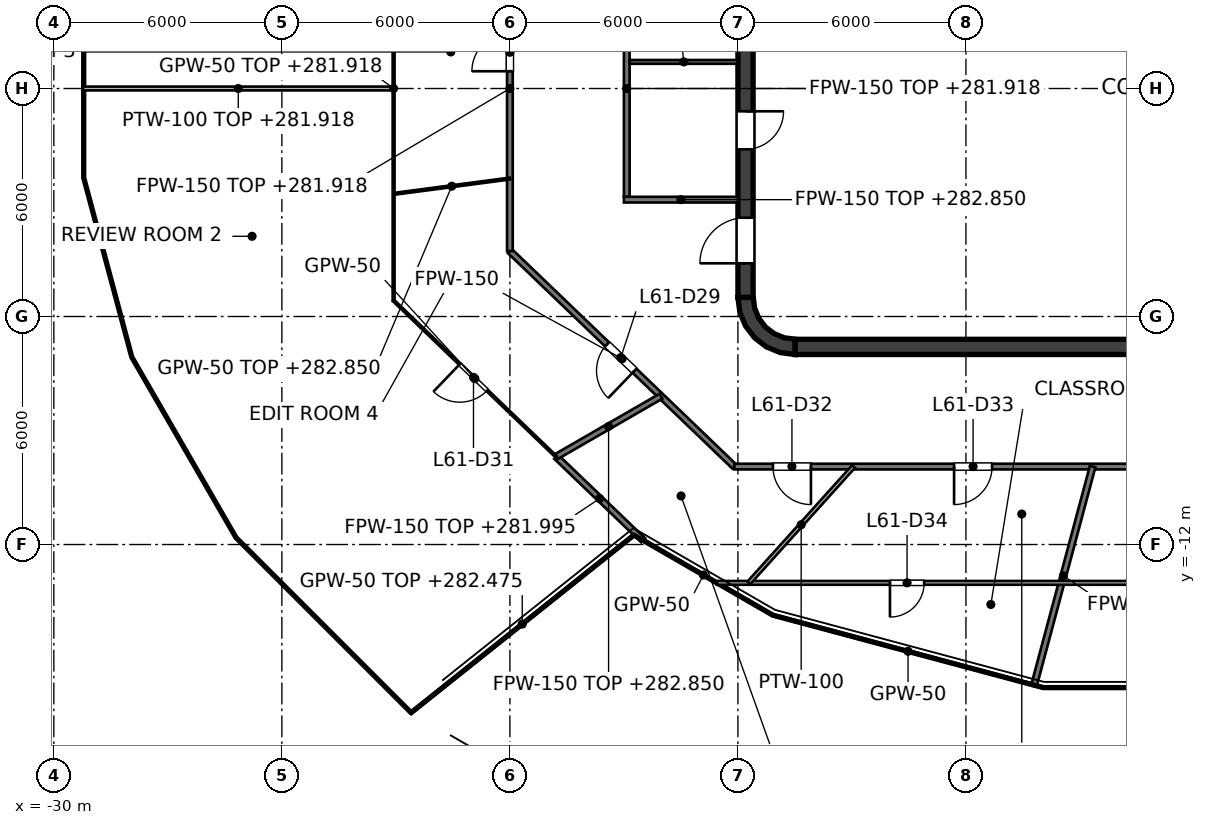
"""IFC4 building model, lengths in metres.
Left out: names, types, materials, properties, quantities, classifications, styles, units other than length and angle.
Written with IfcOpenShell. Run it as: python <this file> out.ifc"""

import sys

from ifc_helpers import new_model, si_unit, direction, frame, frame_2d, origin, place, context, subcontext, project, spatial, polyline, rectangle, outline, extrude, element, fill, save


model = new_model("IFC4")
c1 = context("Model", 3, precision=1e-05, world=origin(), true_north=direction((0.0, 1.0)))
c2 = subcontext(c1, "Body", "Model", "MODEL_VIEW")
j1 = project(units=[si_unit("LENGTHUNIT", "METRE"), si_unit("PLANEANGLEUNIT", "RADIAN")], contexts=[c1])
p1 = place(None, origin())
s1 = spatial("IfcSite", under=j1, at=p1, CompositionType="ELEMENT")
p2 = place(p1, origin())
s2 = spatial("IfcBuilding", under=s1, at=p2, CompositionType="ELEMENT")
p3 = place(p2, frame((0.0, 0.0, 279.0)))
s3 = spatial("IfcBuildingStorey", under=s2, at=p3, CompositionType="ELEMENT", Elevation=279.0)
p4 = place(p3, frame((-10.5, -6.8, 0.0), z_axis=(0.0, 0.0, 1.0), x_axis=(1.0, 0.0, 0.0)))
e1 = element("IfcWall", 1, at=p4, inside=s3, PredefinedType="SHEAR", context=c2, shape_type="SweptSolid", body=[
    extrude(rectangle(XDim=21.0, YDim=0.4, at=frame_2d((10.5, 0.0))), origin(), (0.0, 0.0, 1.0), 4.0),
])
p5 = place(p3, frame((-11.8, -5.5, 0.0), z_axis=(0.0, 0.0, 1.0), x_axis=(0.0, 1.0, 0.0)))
e2 = element("IfcWall", 2, at=p5, inside=s3, PredefinedType="SHEAR", context=c2, shape_type="SweptSolid", body=[
    extrude(rectangle(XDim=11.0, YDim=0.4, at=frame_2d((5.5, 0.0))), origin(), (0.0, 0.0, 1.0), 4.0),
])
p6 = place(p5, frame((3.9, 0.0, 0.0)))
e3 = element("IfcOpeningElement", 3, at=p6, cuts=e2, PredefinedType="OPENING", context=c2, shape_type="SweptSolid", body=[
    extrude(rectangle(XDim=1.0, YDim=2.1, at=frame_2d((0.5, 1.05))), frame((0.0, 0.2, 0.0), z_axis=(0.0, -1.0, 0.0), x_axis=(1.0, 0.0, 0.0)), (0.0, 0.0, 1.0), 0.4),
])
p7 = place(p5, frame((6.8, 0.0, 0.0)))
e4 = element("IfcOpeningElement", 4, at=p7, cuts=e2, PredefinedType="OPENING", context=c2, shape_type="SweptSolid", body=[
    extrude(rectangle(XDim=1.0, YDim=2.1, at=frame_2d((0.5, 1.05))), frame((0.0, 0.2, 0.0), z_axis=(0.0, -1.0, 0.0), x_axis=(1.0, 0.0, 0.0)), (0.0, 0.0, 1.0), 0.4),
])
p8 = place(p5, frame((0.9, 0.0, 0.0)))
e5 = element("IfcOpeningElement", 5, at=p8, cuts=e2, PredefinedType="OPENING", context=c2, shape_type="SweptSolid", body=[
    extrude(rectangle(XDim=1.2, YDim=2.1, at=frame_2d((0.6, 1.05))), frame((0.0, 0.2, 0.0), z_axis=(0.0, -1.0, 0.0), x_axis=(1.0, 0.0, 0.0)), (0.0, 0.0, 1.0), 0.4),
])
p9 = place(p5, frame((8.9, 0.0, 0.0)))
e6 = element("IfcOpeningElement", 6, at=p9, cuts=e2, PredefinedType="OPENING", context=c2, shape_type="SweptSolid", body=[
    extrude(rectangle(XDim=1.2, YDim=2.1, at=frame_2d((0.6, 1.05))), frame((0.0, 0.2, 0.0), z_axis=(0.0, -1.0, 0.0), x_axis=(1.0, 0.0, 0.0)), (0.0, 0.0, 1.0), 0.4),
])
p10 = place(p3, origin())
e7 = element("IfcWall", 7, at=p10, inside=s3, PredefinedType="SHEAR", context=c2, shape_type="SweptSolid", body=[
    extrude(outline(polyline([(-10.5, -7.0), (-10.5, -6.596), (-10.784, -6.559), (-11.048, -6.45), (-11.275, -6.275), (-11.45, -6.048), (-11.559, -5.784), (-11.596, -5.5), (-12.0, -5.5), (-11.949, -5.888), (-11.799, -6.25), (-11.561, -6.561), (-11.25, -6.799), (-10.888, -6.949), (-10.5, -7.0)])), origin(), (0.0, 0.0, 1.0), 4.0),
])
p11 = place(p3, frame((-9.0, -6.6, 0.0), z_axis=(0.0, 0.0, 1.0), x_axis=(0.0, 1.0, 0.0)))
e8 = element("IfcWall", 8, at=p11, inside=s3, PredefinedType="PARTITIONING", context=c2, shape_type="SweptSolid", body=[
    extrude(rectangle(XDim=2.5, YDim=0.25, at=frame_2d((1.25, 0.0))), origin(), (0.0, 0.0, 1.0), 3.85),
])
p12 = place(p11, frame((0.75, 0.0, 0.0)))
e9 = element("IfcOpeningElement", 9, at=p12, cuts=e8, PredefinedType="OPENING", context=c2, shape_type="SweptSolid", body=[
    extrude(rectangle(XDim=1.0, YDim=2.1, at=frame_2d((0.5, 1.05))), frame((0.0, 0.125, 0.0), z_axis=(0.0, -1.0, 0.0), x_axis=(1.0, 0.0, 0.0)), (0.0, 0.0, 1.0), 0.25),
])
p13 = place(p3, frame((-2.9, -6.6, 0.0), z_axis=(0.0, 0.0, 1.0), x_axis=(0.0, 1.0, 0.0)))
e10 = element("IfcWall", 10, at=p13, inside=s3, PredefinedType="PARTITIONING", context=c2, shape_type="SweptSolid", body=[
    extrude(rectangle(XDim=2.5, YDim=0.25, at=frame_2d((1.25, 0.0))), origin(), (0.0, 0.0, 1.0), 3.85),
])
p14 = place(p13, frame((0.8, 0.0, 0.0)))
e11 = element("IfcOpeningElement", 11, at=p14, cuts=e10, PredefinedType="OPENING", context=c2, shape_type="SweptSolid", body=[
    extrude(rectangle(XDim=0.9, YDim=2.1, at=frame_2d((0.45, 1.05))), frame((0.0, 0.125, 0.0), z_axis=(0.0, -1.0, 0.0), x_axis=(1.0, 0.0, 0.0)), (0.0, 0.0, 1.0), 0.25),
])
p15 = place(p3, frame((-9.125, -1.525, 0.0), z_axis=(0.0, 0.0, 1.0), x_axis=(1.0, 0.0, 0.0)))
e12 = element("IfcWall", 12, at=p15, inside=s3, PredefinedType="SOLIDWALL", context=c2, shape_type="SweptSolid", body=[
    extrude(rectangle(XDim=18.25, YDim=0.25, at=frame_2d((9.125, 0.0))), origin(), (0.0, 0.0, 1.0), 3.85),
])
p16 = place(p15, frame((7.15, 0.0, 0.0)))
e13 = element("IfcOpeningElement", 13, at=p16, cuts=e12, PredefinedType="OPENING", context=c2, shape_type="SweptSolid", body=[
    extrude(rectangle(XDim=1.2, YDim=2.1, at=frame_2d((0.6, 1.05))), frame((0.0, 0.125, 0.0), z_axis=(0.0, -1.0, 0.0), x_axis=(1.0, 0.0, 0.0)), (0.0, 0.0, 1.0), 0.25),
])
p17 = place(p15, frame((10.2, 0.0, 0.0)))
e14 = element("IfcOpeningElement", 14, at=p17, cuts=e12, PredefinedType="OPENING", context=c2, shape_type="SweptSolid", body=[
    extrude(rectangle(XDim=1.2, YDim=2.1, at=frame_2d((0.6, 1.05))), frame((0.0, 0.125, 0.0), z_axis=(0.0, -1.0, 0.0), x_axis=(1.0, 0.0, 0.0)), (0.0, 0.0, 1.0), 0.25),
])
p18 = place(p15, frame((16.075, 0.0, 0.0)))
e15 = element("IfcOpeningElement", 15, at=p18, cuts=e12, PredefinedType="OPENING", context=c2, shape_type="SweptSolid", body=[
    extrude(rectangle(XDim=1.0, YDim=2.1, at=frame_2d((0.5, 1.05))), frame((0.0, 0.125, 0.0), z_axis=(0.0, -1.0, 0.0), x_axis=(1.0, 0.0, 0.0)), (0.0, 0.0, 1.0), 0.25),
])
p19 = place(p3, frame((-9.125, -3.975, 0.0), z_axis=(0.0, 0.0, 1.0), x_axis=(1.0, 0.0, 0.0)))
e16 = element("IfcWall", 16, at=p19, inside=s3, PredefinedType="SOLIDWALL", context=c2, shape_type="SweptSolid", body=[
    extrude(rectangle(XDim=12.4, YDim=0.25, at=frame_2d((6.2, 0.0))), origin(), (0.0, 0.0, 1.0), 3.85),
])
p20 = place(p19, frame((1.05, 0.0, 0.0)))
e17 = element("IfcOpeningElement", 17, at=p20, cuts=e16, PredefinedType="OPENING", context=c2, shape_type="SweptSolid", body=[
    extrude(rectangle(XDim=1.2, YDim=2.1, at=frame_2d((0.6, 1.05))), frame((0.0, 0.125, 0.0), z_axis=(0.0, -1.0, 0.0), x_axis=(1.0, 0.0, 0.0)), (0.0, 0.0, 1.0), 0.25),
])
p21 = place(p19, frame((4.1, 0.0, 0.0)))
e18 = element("IfcOpeningElement", 18, at=p21, cuts=e16, PredefinedType="OPENING", context=c2, shape_type="SweptSolid", body=[
    extrude(rectangle(XDim=1.2, YDim=2.1, at=frame_2d((0.6, 1.05))), frame((0.0, 0.125, 0.0), z_axis=(0.0, -1.0, 0.0), x_axis=(1.0, 0.0, 0.0)), (0.0, 0.0, 1.0), 0.25),
])
for number, where, z_axis, x_axis in (
    (19, (-9.0, -3.85, 0.0), (0.0, 0.0, 1.0), (0.0, 1.0, 0.0)),
    (20, (-5.95, -3.85, 0.0), (0.0, 0.0, 1.0), (0.0, 1.0, 0.0)),
    (21, (-2.9, -3.85, 0.0), (0.0, 0.0, 1.0), (0.0, 1.0, 0.0)),
):
    element("IfcWall", number, at=place(p3, frame(where, z_axis=z_axis, x_axis=x_axis)), inside=s3, PredefinedType="SOLIDWALL", context=c2, shape_type="SweptSolid", body=[
        extrude(rectangle(XDim=2.2, YDim=0.25, at=frame_2d((1.1, 0.0))), origin(), (0.0, 0.0, 1.0), 3.85),
    ])
p22 = place(p3, frame((-14.925, -2.85, 0.0), z_axis=(0.0, 0.0, 1.0), x_axis=(0.0, 1.0, 0.0)))
e22 = element("IfcWall", 22, at=p22, inside=s3, PredefinedType="PARTITIONING", context=c2, shape_type="SweptSolid", body=[
    extrude(rectangle(XDim=5.7, YDim=0.15, at=frame_2d((2.85, 0.0))), origin(), (0.0, 0.0, 1.0), 2.918),
])
p23 = place(p3, frame((-15.0, -2.925, 0.0), z_axis=(0.0, 0.0, 1.0), x_axis=(1.0, 0.0, 0.0)))
e23 = element("IfcWall", 23, at=p23, inside=s3, PredefinedType="PARTITIONING", context=c2, shape_type="SweptSolid", body=[
    extrude(rectangle(XDim=3.0, YDim=0.15, at=frame_2d((1.5, 0.0))), origin(), (0.0, 0.0, 1.0), 3.85),
])
p24 = place(p3, frame((-14.85, 0.7, 0.0), z_axis=(0.0, 0.0, 1.0), x_axis=(1.0, 0.0, 0.0)))
e24 = element("IfcWall", 24, at=p24, inside=s3, PredefinedType="PARTITIONING", context=c2, shape_type="SweptSolid", body=[
    extrude(rectangle(XDim=2.85, YDim=0.1, at=frame_2d((1.425, 0.0))), origin(), (0.0, 0.0, 1.0), 3.85),
])
p25 = place(p3, frame((-16.783, -9.69, 0.0), z_axis=(0.0, 0.0, 1.0), x_axis=(0.721336622544, -0.692584635245, 0.0)))
e25 = element("IfcWall", 25, at=p25, inside=s3, PredefinedType="PARTITIONING", context=c2, shape_type="SweptSolid", body=[
    extrude(rectangle(XDim=3.176, YDim=0.15, at=frame_2d((1.588, 0.0))), origin(), (0.0, 0.0, 1.0), 2.995),
])
p26 = place(p3, frame((-18.0, -4.278, 0.0), z_axis=(0.0, 0.0, 1.0), x_axis=(0.721348586031, -0.692572174889, 0.0)))
e26 = element("IfcWall", 26, at=p26, inside=s3, PredefinedType="PARTITIONING", context=c2, shape_type="SweptSolid", body=[
    extrude(rectangle(XDim=8.187, YDim=0.15, at=frame_2d((4.094, 0.0))), origin(), (0.0, 0.0, 1.0), 2.927),
])
p27 = place(p26, frame((3.546, 0.0, 0.0)))
e27 = element("IfcOpeningElement", 27, at=p27, cuts=e26, PredefinedType="OPENING", context=c2, shape_type="SweptSolid", body=[
    extrude(rectangle(XDim=1.0, YDim=2.1, at=frame_2d((0.5, 1.05))), frame((0.0, 0.075, 0.0), z_axis=(0.0, -1.0, 0.0), x_axis=(1.0, 0.0, 0.0)), (0.0, 0.0, 1.0), 0.15),
])
p28 = place(p3, frame((-12.095, -9.949, 0.0), z_axis=(0.0, 0.0, 1.0), x_axis=(1.0, 0.0, 0.0)))
e28 = element("IfcWall", 28, at=p28, inside=s3, PredefinedType="PARTITIONING", context=c2, shape_type="SweptSolid", body=[
    extrude(rectangle(XDim=24.19, YDim=0.15, at=frame_2d((12.095, 0.0))), origin(), (0.0, 0.0, 1.0), 2.927),
])
p29 = place(p28, frame((16.259, 0.0, 0.0)))
e29 = element("IfcOpeningElement", 29, at=p29, cuts=e28, PredefinedType="OPENING", context=c2, shape_type="SweptSolid", body=[
    extrude(rectangle(XDim=1.0, YDim=2.1, at=frame_2d((0.5, 1.05))), frame((0.0, 0.075, 0.0), z_axis=(0.0, -1.0, 0.0), x_axis=(1.0, 0.0, 0.0)), (0.0, 0.0, 1.0), 0.15),
])
p30 = place(p28, frame((1.016, 0.0, 0.0)))
e30 = element("IfcOpeningElement", 30, at=p30, cuts=e28, PredefinedType="OPENING", context=c2, shape_type="SweptSolid", body=[
    extrude(rectangle(XDim=1.0, YDim=2.1, at=frame_2d((0.5, 1.05))), frame((0.0, 0.075, 0.0), z_axis=(0.0, -1.0, 0.0), x_axis=(1.0, 0.0, 0.0)), (0.0, 0.0, 1.0), 0.15),
])
p31 = place(p28, frame((5.783, 0.0, 0.0)))
e31 = element("IfcOpeningElement", 31, at=p31, cuts=e28, PredefinedType="OPENING", context=c2, shape_type="SweptSolid", body=[
    extrude(rectangle(XDim=1.0, YDim=2.1, at=frame_2d((0.5, 1.05))), frame((0.0, 0.075, 0.0), z_axis=(0.0, -1.0, 0.0), x_axis=(1.0, 0.0, 0.0)), (0.0, 0.0, 1.0), 0.15),
])
p32 = place(p3, frame((-16.783, -9.69, 0.0), z_axis=(0.0, 0.0, 1.0), x_axis=(0.866013304951, 0.500020955208, 0.0)))
e32 = element("IfcWall", 32, at=p32, inside=s3, PredefinedType="PARTITIONING", context=c2, shape_type="SweptSolid", body=[
    extrude(rectangle(XDim=3.186, YDim=0.15, at=frame_2d((1.593, 0.0))), origin(), (0.0, 0.0, 1.0), 3.85),
])
p33 = place(p3, frame((-4.207, -15.701, 0.0), z_axis=(0.0, 0.0, 1.0), x_axis=(0.258785268971, 0.965934875943, 0.0)))
e33 = element("IfcWall", 33, at=p33, inside=s3, PredefinedType="PARTITIONING", context=c2, shape_type="SweptSolid", body=[
    extrude(rectangle(XDim=5.955, YDim=0.15, at=frame_2d((2.978, 0.0))), origin(), (0.0, 0.0, 1.0), 3.85),
])
p34 = place(p3, frame((-18.0, -4.278, 0.0), z_axis=(0.0, 0.0, 1.0), x_axis=(0.0, 1.0, 0.0)))
e34 = element("IfcWall", 34, at=p34, inside=s3, PredefinedType="PARTITIONING", context=c2, shape_type="SweptSolid", body=[
    extrude(rectangle(XDim=8.556, YDim=0.15, at=frame_2d((4.278, 0.0))), origin(), (0.0, 0.0, 1.0), 2.918),
])
p35 = place(p34, frame((4.732, 0.0, 0.0)))
e35 = element("IfcOpeningElement", 35, at=p35, cuts=e34, PredefinedType="OPENING", context=c2, shape_type="SweptSolid", body=[
    extrude(rectangle(XDim=1.0, YDim=2.1, at=frame_2d((0.5, 1.05))), frame((0.0, 0.075, 0.0), z_axis=(0.0, -1.0, 0.0), x_axis=(1.0, 0.0, 0.0)), (0.0, 0.0, 1.0), 0.15),
])
p36 = place(p3, frame((-21.06, -5.582, 0.0), z_axis=(0.0, 0.0, 1.0), x_axis=(0.721227701814, -0.692698059862, 0.0)))
e36 = element("IfcWall", 36, at=p36, inside=s3, PredefinedType="PARTITIONING", context=c2, shape_type="SweptSolid", body=[
    extrude(rectangle(XDim=5.93, YDim=0.05, at=frame_2d((2.965, 0.0))), origin(), (0.0, 0.0, 1.0), 2.927),
])
p37 = place(p36, frame((2.415, 0.0, 0.0)))
e37 = element("IfcOpeningElement", 37, at=p37, cuts=e36, PredefinedType="OPENING", context=c2, shape_type="SweptSolid", body=[
    extrude(rectangle(XDim=1.0, YDim=2.1, at=frame_2d((0.5, 1.05))), frame((0.0, 0.025, 0.0), z_axis=(0.0, -1.0, 0.0), x_axis=(1.0, 0.0, 0.0)), (0.0, 0.0, 1.0), 0.05),
])
p38 = place(p3, frame((-14.735, -11.749, 0.0), z_axis=(0.0, 0.0, 1.0), x_axis=(0.866163431647, -0.499760852486, 0.0)))
e38 = element("IfcWall", 38, at=p38, inside=s3, PredefinedType="PARTITIONING", context=c2, shape_type="SweptSolid", body=[
    extrude(rectangle(XDim=4.22, YDim=0.05, at=frame_2d((2.11, 0.0))), origin(), (0.0, 0.0, 1.0), 2.927),
])
p39 = place(p3, frame((-11.081, -13.859, 0.0), z_axis=(0.0, 0.0, 1.0), x_axis=(0.966075753544, -0.258258859314, 0.0)))
e39 = element("IfcWall", 39, at=p39, inside=s3, PredefinedType="PARTITIONING", context=c2, shape_type="SweptSolid", body=[
    extrude(rectangle(XDim=7.365, YDim=0.05, at=frame_2d((3.683, 0.0))), origin(), (0.0, 0.0, 1.0), 2.927),
])
p40 = place(p3, frame((-3.967, -15.765, 0.0), z_axis=(0.0, 0.0, 1.0), x_axis=(1.0, 0.0, 0.0)))
e40 = element("IfcWall", 40, at=p40, inside=s3, PredefinedType="PARTITIONING", context=c2, shape_type="SweptSolid", body=[
    extrude(rectangle(XDim=7.934, YDim=0.05, at=frame_2d((3.967, 0.0))), origin(), (0.0, 0.0, 1.0), 2.927),
])
p41 = place(p3, frame((-21.06, -2.773, 0.0), z_axis=(0.0, 0.0, 1.0), x_axis=(0.991446216664, 0.130515897359, 0.0)))
e41 = element("IfcWall", 41, at=p41, inside=s3, PredefinedType="PARTITIONING", context=c2, shape_type="SweptSolid", body=[
    extrude(rectangle(XDim=3.086, YDim=0.05, at=frame_2d((1.543, 0.0))), origin(), (0.0, 0.0, 1.0), 3.85),
])
p42 = place(p3, frame((-20.615, -16.438, 0.0), z_axis=(0.0, 0.0, 1.0), x_axis=(0.781837006738, 0.623482874581, 0.0)))
e42 = element("IfcWall", 42, at=p42, inside=s3, PredefinedType="PARTITIONING", context=c2, shape_type="SweptSolid", body=[
    extrude(rectangle(XDim=7.521, YDim=0.05, at=frame_2d((3.76, 0.0))), origin(), (0.0, 0.0, 1.0), 3.475),
])
p43 = place(p3, frame((-21.06, -5.582, 0.0), z_axis=(0.0, 0.0, 1.0), x_axis=(0.0, 1.0, 0.0)))
e43 = element("IfcWall", 43, at=p43, inside=s3, PredefinedType="PARTITIONING", context=c2, shape_type="SweptSolid", body=[
    extrude(rectangle(XDim=11.164, YDim=0.05, at=frame_2d((5.582, 0.0))), origin(), (0.0, 0.0, 1.0), 2.918),
])
p44 = place(p43, frame((7.822, 0.0, 0.0)))
e44 = element("IfcOpeningElement", 44, at=p44, cuts=e43, PredefinedType="OPENING", context=c2, shape_type="SweptSolid", body=[
    extrude(rectangle(XDim=1.0, YDim=2.1, at=frame_2d((0.5, 1.05))), frame((0.0, 0.025, 0.0), z_axis=(0.0, -1.0, 0.0), x_axis=(1.0, 0.0, 0.0)), (0.0, 0.0, 1.0), 0.05),
])
p45 = place(p3, frame((-12.553, -13.009, 0.0), z_axis=(0.0, 0.0, 1.0), x_axis=(1.0, 0.0, 0.0)))
e45 = element("IfcWall", 45, at=p45, inside=s3, PredefinedType="PARTITIONING", context=c2, shape_type="SweptSolid", body=[
    extrude(rectangle(XDim=25.879, YDim=0.1, at=frame_2d((12.939, 0.0))), origin(), (0.0, 0.0, 1.0), 2.927),
])
p46 = place(p45, frame((16.973, 0.0, 0.0)))
e46 = element("IfcOpeningElement", 46, at=p46, cuts=e45, PredefinedType="OPENING", context=c2, shape_type="SweptSolid", body=[
    extrude(rectangle(XDim=0.9, YDim=2.1, at=frame_2d((0.45, 1.05))), frame((0.0, 0.05, 0.0), z_axis=(0.0, -1.0, 0.0), x_axis=(1.0, 0.0, 0.0)), (0.0, 0.0, 1.0), 0.1),
])
p47 = place(p45, frame((4.554, 0.0, 0.0)))
e47 = element("IfcOpeningElement", 47, at=p47, cuts=e45, PredefinedType="OPENING", context=c2, shape_type="SweptSolid", body=[
    extrude(rectangle(XDim=0.9, YDim=2.1, at=frame_2d((0.45, 1.05))), frame((0.0, 0.05, 0.0), z_axis=(0.0, -1.0, 0.0), x_axis=(1.0, 0.0, 0.0)), (0.0, 0.0, 1.0), 0.1),
])
p48 = place(p3, frame((-29.234, 0.0, 0.0), z_axis=(0.0, 0.0, 1.0), x_axis=(1.0, 0.0, 0.0)))
e48 = element("IfcWall", 48, at=p48, inside=s3, PredefinedType="PARTITIONING", context=c2, shape_type="SweptSolid", body=[
    extrude(rectangle(XDim=8.174, YDim=0.1, at=frame_2d((4.087, 0.0))), origin(), (0.0, 0.0, 1.0), 2.918),
])
p49 = place(p3, frame((-11.713, -13.009, 0.0), z_axis=(0.0, 0.0, 1.0), x_axis=(0.669076105541, 0.743193894616, 0.0)))
e49 = element("IfcWall", 49, at=p49, inside=s3, PredefinedType="PARTITIONING", context=c2, shape_type="SweptSolid", body=[
    extrude(rectangle(XDim=4.117, YDim=0.1, at=frame_2d((2.059, 0.0))), origin(), (0.0, 0.0, 1.0), 2.927),
])
p50 = place(p20, origin())
e50 = element("IfcDoor", 50, at=p50, inside=s3, OperationType="DOUBLE_DOOR_SLIDING", PredefinedType="DOOR", context=c2, shape_type="SweptSolid", body=[
    extrude(rectangle(XDim=1.2, YDim=2.1, at=frame_2d((0.6, 1.05))), frame((0.0, 0.025, 0.0), z_axis=(0.0, -1.0, 0.0), x_axis=(1.0, 0.0, 0.0)), (0.0, 0.0, 1.0), 0.05),
])
fill(e17, e50)
p51 = place(p21, origin())
e51 = element("IfcDoor", 51, at=p51, inside=s3, OperationType="DOUBLE_DOOR_SLIDING", PredefinedType="DOOR", context=c2, shape_type="SweptSolid", body=[
    extrude(rectangle(XDim=1.2, YDim=2.1, at=frame_2d((0.6, 1.05))), frame((0.0, 0.025, 0.0), z_axis=(0.0, -1.0, 0.0), x_axis=(1.0, 0.0, 0.0)), (0.0, 0.0, 1.0), 0.05),
])
fill(e18, e51)
p52 = place(p16, origin())
e52 = element("IfcDoor", 52, at=p52, inside=s3, OperationType="DOUBLE_DOOR_SLIDING", PredefinedType="DOOR", context=c2, shape_type="SweptSolid", body=[
    extrude(rectangle(XDim=1.2, YDim=2.1, at=frame_2d((0.6, 1.05))), frame((0.0, 0.025, 0.0), z_axis=(0.0, -1.0, 0.0), x_axis=(1.0, 0.0, 0.0)), (0.0, 0.0, 1.0), 0.05),
])
fill(e13, e52)
p53 = place(p12, origin())
e53 = element("IfcDoor", 53, at=p53, inside=s3, OperationType="SINGLE_SWING_LEFT", PredefinedType="DOOR", context=c2, shape_type="SweptSolid", body=[
    extrude(rectangle(XDim=1.0, YDim=2.1, at=frame_2d((0.5, 1.05))), frame((0.0, 0.025, 0.0), z_axis=(0.0, -1.0, 0.0), x_axis=(1.0, 0.0, 0.0)), (0.0, 0.0, 1.0), 0.05),
])
fill(e9, e53)
p54 = place(p14, origin())
e54 = element("IfcDoor", 54, at=p54, inside=s3, OperationType="SINGLE_SWING_RIGHT", PredefinedType="DOOR", context=c2, shape_type="SweptSolid", body=[
    extrude(rectangle(XDim=0.9, YDim=2.1, at=frame_2d((0.45, 1.05))), frame((0.0, 0.025, 0.0), z_axis=(0.0, -1.0, 0.0), x_axis=(1.0, 0.0, 0.0)), (0.0, 0.0, 1.0), 0.05),
])
fill(e11, e54)
p55 = place(p6, origin())
e55 = element("IfcDoor", 55, at=p55, inside=s3, OperationType="SINGLE_SWING_RIGHT", PredefinedType="DOOR", context=c2, shape_type="SweptSolid", body=[
    extrude(rectangle(XDim=1.0, YDim=2.1, at=frame_2d((0.5, 1.05))), frame((0.0, 0.025, 0.0), z_axis=(0.0, -1.0, 0.0), x_axis=(1.0, 0.0, 0.0)), (0.0, 0.0, 1.0), 0.05),
])
fill(e3, e55)
p56 = place(p8, origin())
e56 = element("IfcDoor", 56, at=p56, inside=s3, OperationType="SINGLE_SWING_LEFT", PredefinedType="DOOR", context=c2, shape_type="SweptSolid", body=[
    extrude(rectangle(XDim=1.2, YDim=2.1, at=frame_2d((0.6, 1.05))), frame((0.0, 0.025, 0.0), z_axis=(0.0, -1.0, 0.0), x_axis=(1.0, 0.0, 0.0)), (0.0, 0.0, 1.0), 0.05),
])
fill(e5, e56)
p57 = place(p35, origin())
e57 = element("IfcDoor", 57, at=p57, inside=s3, OperationType="SINGLE_SWING_LEFT", PredefinedType="DOOR", context=c2, shape_type="SweptSolid", body=[
    extrude(rectangle(XDim=1.0, YDim=2.1, at=frame_2d((0.5, 1.05))), frame((0.0, 0.025, 0.0), z_axis=(0.0, -1.0, 0.0), x_axis=(1.0, 0.0, 0.0)), (0.0, 0.0, 1.0), 0.05),
])
fill(e35, e57)
p58 = place(p27, origin())
e58 = element("IfcDoor", 58, at=p58, inside=s3, OperationType="SINGLE_SWING_RIGHT", PredefinedType="DOOR", context=c2, shape_type="SweptSolid", body=[
    extrude(rectangle(XDim=1.0, YDim=2.1, at=frame_2d((0.5, 1.05))), frame((0.0, 0.025, 0.0), z_axis=(0.0, -1.0, 0.0), x_axis=(1.0, 0.0, 0.0)), (0.0, 0.0, 1.0), 0.05),
])
fill(e27, e58)
p59 = place(p37, origin())
e59 = element("IfcDoor", 59, at=p59, inside=s3, OperationType="SINGLE_SWING_LEFT", PredefinedType="DOOR", context=c2, shape_type="SweptSolid", body=[
    extrude(rectangle(XDim=1.0, YDim=2.1, at=frame_2d((0.5, 1.05))), frame((0.0, 0.025, 0.0), z_axis=(0.0, -1.0, 0.0), x_axis=(1.0, 0.0, 0.0)), (0.0, 0.0, 1.0), 0.05),
])
fill(e37, e59)
p60 = place(p30, origin())
e60 = element("IfcDoor", 60, at=p60, inside=s3, OperationType="SINGLE_SWING_RIGHT", PredefinedType="DOOR", context=c2, shape_type="SweptSolid", body=[
    extrude(rectangle(XDim=1.0, YDim=2.1, at=frame_2d((0.5, 1.05))), frame((0.0, 0.025, 0.0), z_axis=(0.0, -1.0, 0.0), x_axis=(1.0, 0.0, 0.0)), (0.0, 0.0, 1.0), 0.05),
])
fill(e30, e60)
p61 = place(p31, origin())
e61 = element("IfcDoor", 61, at=p61, inside=s3, OperationType="SINGLE_SWING_LEFT", PredefinedType="DOOR", context=c2, shape_type="SweptSolid", body=[
    extrude(rectangle(XDim=1.0, YDim=2.1, at=frame_2d((0.5, 1.05))), frame((0.0, 0.025, 0.0), z_axis=(0.0, -1.0, 0.0), x_axis=(1.0, 0.0, 0.0)), (0.0, 0.0, 1.0), 0.05),
])
fill(e31, e61)
p62 = place(p47, origin())
e62 = element("IfcDoor", 62, at=p62, inside=s3, OperationType="SINGLE_SWING_LEFT", PredefinedType="DOOR", context=c2, shape_type="SweptSolid", body=[
    extrude(rectangle(XDim=0.9, YDim=2.1, at=frame_2d((0.45, 1.05))), frame((0.0, 0.025, 0.0), z_axis=(0.0, -1.0, 0.0), x_axis=(1.0, 0.0, 0.0)), (0.0, 0.0, 1.0), 0.05),
])
fill(e47, e62)
save(model, sys.argv[1])
